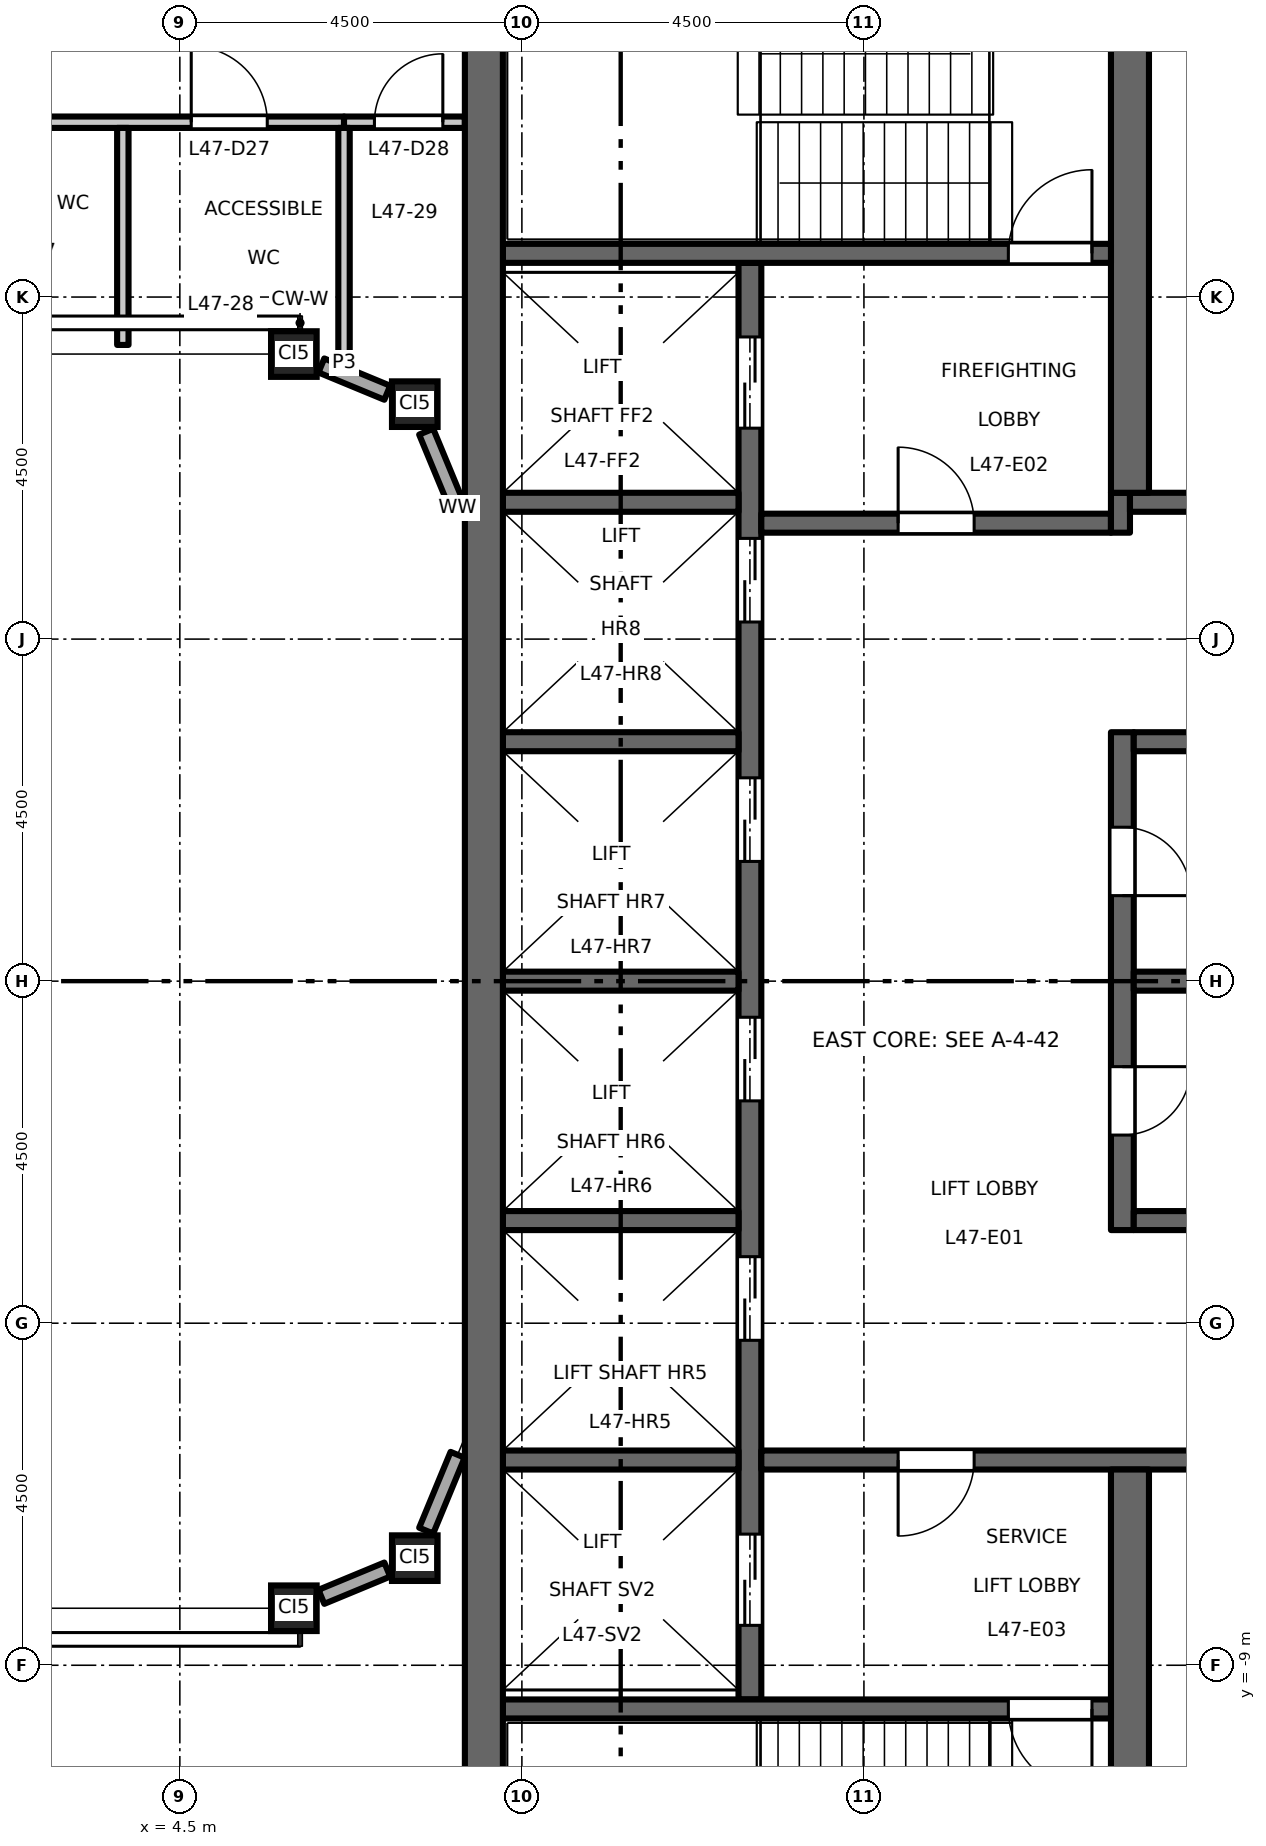
"""IFC4 building model, lengths in metres.
Left out: names, types, materials, properties, quantities, classifications, styles, units other than length and angle.
Written with IfcOpenShell. Run it as: python <this file> out.ifc"""

import sys

from ifc_helpers import new_model, si_unit, direction, frame, frame_2d, origin, origin_2d, place, context, subcontext, project, spatial, rectangle, hollow_rectangle, extrude, element, fill, save


model = new_model("IFC4")
c1 = context("Model", 3, precision=1e-05, world=origin(), true_north=direction((0.0, 1.0)))
c2 = subcontext(c1, "Body", "Model", "MODEL_VIEW")
j1 = project(units=[si_unit("LENGTHUNIT", "METRE"), si_unit("PLANEANGLEUNIT", "RADIAN")], contexts=[c1])
p1 = place(None, origin())
s1 = spatial("IfcSite", under=j1, at=p1, CompositionType="ELEMENT")
p2 = place(p1, origin())
s2 = spatial("IfcBuilding", under=s1, at=p2, CompositionType="ELEMENT")
p3 = place(p2, frame((0.0, 0.0, 219.7)))
s3 = spatial("IfcBuildingStorey", under=s2, at=p3, CompositionType="ELEMENT", Elevation=219.7)
for number, where, z_axis, x_axis in (
    (1, (6.0, -8.25, 0.0), (0.0, 0.0, 1.0), (1.0, 0.0, 0.0)),
    (2, (7.591, -7.591, 0.0), (0.0, 0.0, 1.0), (1.0, 0.0, 0.0)),
    (3, (6.0, 8.25, 0.0), (0.0, 0.0, 1.0), (1.0, 0.0, 0.0)),
    (4, (7.591, 7.591, 0.0), (0.0, 0.0, 1.0), (1.0, 0.0, 0.0)),
):
    element("IfcColumn", number, at=place(p3, frame(where, z_axis=z_axis, x_axis=x_axis)), inside=s3, PredefinedType="COLUMN", context=c2, shape_type="SweptSolid", body=[
        extrude(hollow_rectangle(XDim=0.6, YDim=0.6, WallThickness=0.032, at=origin_2d()), origin(), (0.0, 0.0, 1.0), 4.5),
    ])
p4 = place(p3, frame((12.0, -9.45, 0.0), z_axis=(0.0, 0.0, 1.0), x_axis=(0.0, 1.0, 0.0)))
e5 = element("IfcWall", 5, at=p4, inside=s3, PredefinedType="SHEAR", context=c2, shape_type="SweptSolid", body=[
    extrude(rectangle(XDim=18.9, YDim=0.3, at=frame_2d((9.45, 0.0))), origin(), (0.0, 0.0, 1.0), 4.35),
])
p5 = place(p4, frame((4.725, 0.0, 0.0)))
e6 = element("IfcOpeningElement", 6, at=p5, cuts=e5, PredefinedType="OPENING", context=c2, shape_type="SweptSolid", body=[
    extrude(rectangle(XDim=1.1, YDim=2.1, at=frame_2d((0.55, 1.05))), frame((0.0, 0.16, 0.0), z_axis=(0.0, -1.0, 0.0), x_axis=(1.0, 0.0, 0.0)), (0.0, 0.0, 1.0), 0.32),
])
p6 = place(p4, frame((7.875, 0.0, 0.0)))
e7 = element("IfcOpeningElement", 7, at=p6, cuts=e5, PredefinedType="OPENING", context=c2, shape_type="SweptSolid", body=[
    extrude(rectangle(XDim=1.1, YDim=2.1, at=frame_2d((0.55, 1.05))), frame((0.0, 0.16, 0.0), z_axis=(0.0, -1.0, 0.0), x_axis=(1.0, 0.0, 0.0)), (0.0, 0.0, 1.0), 0.32),
])
p7 = place(p4, frame((11.025, 0.0, 0.0)))
e8 = element("IfcOpeningElement", 8, at=p7, cuts=e5, PredefinedType="OPENING", context=c2, shape_type="SweptSolid", body=[
    extrude(rectangle(XDim=1.1, YDim=2.1, at=frame_2d((0.55, 1.05))), frame((0.0, 0.16, 0.0), z_axis=(0.0, -1.0, 0.0), x_axis=(1.0, 0.0, 0.0)), (0.0, 0.0, 1.0), 0.32),
])
p8 = place(p4, frame((14.175, 0.0, 0.0)))
e9 = element("IfcOpeningElement", 9, at=p8, cuts=e5, PredefinedType="OPENING", context=c2, shape_type="SweptSolid", body=[
    extrude(rectangle(XDim=1.1, YDim=2.1, at=frame_2d((0.55, 1.05))), frame((0.0, 0.16, 0.0), z_axis=(0.0, -1.0, 0.0), x_axis=(1.0, 0.0, 0.0)), (0.0, 0.0, 1.0), 0.32),
])
p9 = place(p4, frame((16.725, 0.0, 0.0)))
e10 = element("IfcOpeningElement", 10, at=p9, cuts=e5, PredefinedType="OPENING", context=c2, shape_type="SweptSolid", body=[
    extrude(rectangle(XDim=1.2, YDim=2.1, at=frame_2d((0.6, 1.05))), frame((0.0, 0.16, 0.0), z_axis=(0.0, -1.0, 0.0), x_axis=(1.0, 0.0, 0.0)), (0.0, 0.0, 1.0), 0.32),
])
p10 = place(p4, frame((0.975, 0.0, 0.0)))
e11 = element("IfcOpeningElement", 11, at=p10, cuts=e5, PredefinedType="OPENING", context=c2, shape_type="SweptSolid", body=[
    extrude(rectangle(XDim=1.2, YDim=2.1, at=frame_2d((0.6, 1.05))), frame((0.0, 0.16, 0.0), z_axis=(0.0, -1.0, 0.0), x_axis=(1.0, 0.0, 0.0)), (0.0, 0.0, 1.0), 0.32),
])
p11 = place(p3, frame((12.15, 6.025, 0.0), z_axis=(0.0, 0.0, 1.0), x_axis=(1.0, 0.0, 0.0)))
e12 = element("IfcWall", 12, at=p11, inside=s3, PredefinedType="SHEAR", context=c2, shape_type="SweptSolid", body=[
    extrude(rectangle(XDim=4.6, YDim=0.25, at=frame_2d((2.3, 0.0))), origin(), (0.0, 0.0, 1.0), 4.35),
])
p12 = place(p11, frame((1.8, 0.0, 0.0)))
e13 = element("IfcOpeningElement", 13, at=p12, cuts=e12, PredefinedType="OPENING", context=c2, shape_type="SweptSolid", body=[
    extrude(rectangle(XDim=1.0, YDim=2.1, at=frame_2d((0.5, 1.05))), frame((0.0, 0.135, 0.0), z_axis=(0.0, -1.0, 0.0), x_axis=(1.0, 0.0, 0.0)), (0.0, 0.0, 1.0), 0.27),
])
p13 = place(p3, frame((16.875, 5.9, 0.0), z_axis=(0.0, 0.0, 1.0), x_axis=(0.0, 1.0, 0.0)))
e14 = element("IfcWall", 14, at=p13, inside=s3, PredefinedType="SHEAR", context=c2, shape_type="SweptSolid", body=[
    extrude(rectangle(XDim=0.525, YDim=0.25, at=frame_2d((0.263, 0.0))), origin(), (0.0, 0.0, 1.0), 4.35),
])
p14 = place(p3, frame((17.0, 6.3, 0.0), z_axis=(0.0, 0.0, 1.0), x_axis=(1.0, 0.0, 0.0)))
e15 = element("IfcWall", 15, at=p14, inside=s3, PredefinedType="SHEAR", context=c2, shape_type="SweptSolid", body=[
    extrude(rectangle(XDim=4.25, YDim=0.25, at=frame_2d((2.125, 0.0))), origin(), (0.0, 0.0, 1.0), 4.35),
])
p15 = place(p3, frame((12.15, -6.3, 0.0), z_axis=(0.0, 0.0, 1.0), x_axis=(1.0, 0.0, 0.0)))
e16 = element("IfcWall", 16, at=p15, inside=s3, PredefinedType="SHEAR", context=c2, shape_type="SweptSolid", body=[
    extrude(rectangle(XDim=9.1, YDim=0.25, at=frame_2d((4.55, 0.0))), origin(), (0.0, 0.0, 1.0), 4.35),
])
p16 = place(p15, frame((1.8, 0.0, 0.0)))
e17 = element("IfcOpeningElement", 17, at=p16, cuts=e16, PredefinedType="OPENING", context=c2, shape_type="SweptSolid", body=[
    extrude(rectangle(XDim=1.0, YDim=2.1, at=frame_2d((0.5, 1.05))), frame((0.0, 0.135, 0.0), z_axis=(0.0, -1.0, 0.0), x_axis=(1.0, 0.0, 0.0)), (0.0, 0.0, 1.0), 0.27),
])
p17 = place(p3, frame((16.9, -3.275, 0.0), z_axis=(0.0, 0.0, 1.0), x_axis=(0.0, 1.0, 0.0)))
e18 = element("IfcWall", 18, at=p17, inside=s3, PredefinedType="SHEAR", context=c2, shape_type="SweptSolid", body=[
    extrude(rectangle(XDim=6.55, YDim=0.3, at=frame_2d((3.275, 0.0))), origin(), (0.0, 0.0, 1.0), 4.35),
])
p18 = place(p17, frame((1.25, 0.0, 0.0)))
e19 = element("IfcOpeningElement", 19, at=p18, cuts=e18, PredefinedType="OPENING", context=c2, shape_type="SweptSolid", body=[
    extrude(rectangle(XDim=0.9, YDim=2.1, at=frame_2d((0.45, 1.05))), frame((0.0, 0.16, 0.0), z_axis=(0.0, -1.0, 0.0), x_axis=(1.0, 0.0, 0.0)), (0.0, 0.0, 1.0), 0.32),
])
p19 = place(p17, frame((4.4, 0.0, 0.0)))
e20 = element("IfcOpeningElement", 20, at=p19, cuts=e18, PredefinedType="OPENING", context=c2, shape_type="SweptSolid", body=[
    extrude(rectangle(XDim=0.9, YDim=2.1, at=frame_2d((0.45, 1.05))), frame((0.0, 0.16, 0.0), z_axis=(0.0, -1.0, 0.0), x_axis=(1.0, 0.0, 0.0)), (0.0, 0.0, 1.0), 0.32),
])
for number, where, z_axis, x_axis in (
    (21, (17.05, 0.0, 0.0), (0.0, 0.0, 1.0), (1.0, 0.0, 0.0)),
    (22, (17.05, 3.15, 0.0), (0.0, 0.0, 1.0), (1.0, 0.0, 0.0)),
    (23, (17.05, -3.15, 0.0), (0.0, 0.0, 1.0), (1.0, 0.0, 0.0)),
):
    element("IfcWall", number, at=place(p3, frame(where, z_axis=z_axis, x_axis=x_axis)), inside=s3, PredefinedType="SHEAR", context=c2, shape_type="SweptSolid", body=[
        extrude(rectangle(XDim=4.2, YDim=0.25, at=frame_2d((2.1, 0.0))), origin(), (0.0, 0.0, 1.0), 4.35),
    ])
for number, where, z_axis, x_axis in (
    (24, (17.0, 6.425, 0.0), (0.0, 0.0, 1.0), (0.0, 1.0, 0.0)),
    (25, (17.0, -13.0, 0.0), (0.0, 0.0, 1.0), (0.0, 1.0, 0.0)),
):
    element("IfcWall", number, at=place(p3, frame(where, z_axis=z_axis, x_axis=x_axis)), inside=s3, PredefinedType="SHEAR", context=c2, shape_type="SweptSolid", body=[
        extrude(rectangle(XDim=6.575, YDim=0.5, at=frame_2d((3.288, 0.0))), origin(), (0.0, 0.0, 1.0), 4.35),
    ])
for number, where, z_axis, x_axis in (
    (26, (8.75, 0.0, 0.0), (0.0, 0.0, 1.0), (1.0, 0.0, 0.0)),
    (27, (8.75, 3.15, 0.0), (0.0, 0.0, 1.0), (1.0, 0.0, 0.0)),
    (28, (8.75, 6.3, 0.0), (0.0, 0.0, 1.0), (1.0, 0.0, 0.0)),
    (29, (8.75, -3.15, 0.0), (0.0, 0.0, 1.0), (1.0, 0.0, 0.0)),
    (30, (8.75, -6.3, 0.0), (0.0, 0.0, 1.0), (1.0, 0.0, 0.0)),
):
    element("IfcWall", number, at=place(p3, frame(where, z_axis=z_axis, x_axis=x_axis)), inside=s3, PredefinedType="SHEAR", context=c2, shape_type="SweptSolid", body=[
        extrude(rectangle(XDim=3.1, YDim=0.25, at=frame_2d((1.55, 0.0))), origin(), (0.0, 0.0, 1.0), 4.35),
    ])
p20 = place(p3, frame((8.75, 9.575, 0.0), z_axis=(0.0, 0.0, 1.0), x_axis=(1.0, 0.0, 0.0)))
e31 = element("IfcWall", 31, at=p20, inside=s3, PredefinedType="SHEAR", context=c2, shape_type="SweptSolid", body=[
    extrude(rectangle(XDim=8.0, YDim=0.25, at=frame_2d((4.0, 0.0))), origin(), (0.0, 0.0, 1.0), 4.35),
])
p21 = place(p20, frame((6.65, 0.0, 0.0)))
e32 = element("IfcOpeningElement", 32, at=p21, cuts=e31, PredefinedType="OPENING", context=c2, shape_type="SweptSolid", body=[
    extrude(rectangle(XDim=1.1, YDim=2.1, at=frame_2d((0.55, 1.05))), frame((0.0, 0.135, 0.0), z_axis=(0.0, -1.0, 0.0), x_axis=(1.0, 0.0, 0.0)), (0.0, 0.0, 1.0), 0.27),
])
p22 = place(p3, frame((8.75, -9.575, 0.0), z_axis=(0.0, 0.0, 1.0), x_axis=(1.0, 0.0, 0.0)))
e33 = element("IfcWall", 33, at=p22, inside=s3, PredefinedType="SHEAR", context=c2, shape_type="SweptSolid", body=[
    extrude(rectangle(XDim=8.0, YDim=0.25, at=frame_2d((4.0, 0.0))), origin(), (0.0, 0.0, 1.0), 4.35),
])
p23 = place(p22, frame((6.65, 0.0, 0.0)))
e34 = element("IfcOpeningElement", 34, at=p23, cuts=e33, PredefinedType="OPENING", context=c2, shape_type="SweptSolid", body=[
    extrude(rectangle(XDim=1.1, YDim=2.1, at=frame_2d((0.55, 1.05))), frame((0.0, 0.135, 0.0), z_axis=(0.0, -1.0, 0.0), x_axis=(1.0, 0.0, 0.0)), (0.0, 0.0, 1.0), 0.27),
])
p24 = place(p3, frame((8.5, -13.0, 0.0), z_axis=(0.0, 0.0, 1.0), x_axis=(0.0, 1.0, 0.0)))
e35 = element("IfcWall", 35, at=p24, inside=s3, PredefinedType="SHEAR", context=c2, shape_type="SweptSolid", body=[
    extrude(rectangle(XDim=26.0, YDim=0.5, at=frame_2d((13.0, 0.0))), origin(), (0.0, 0.0, 1.0), 4.35),
])
p25 = place(p3, frame((6.362, -8.1, 0.0), z_axis=(0.0, 0.0, 1.0), x_axis=(0.923829670615, 0.382803787458, 0.0)))
e36 = element("IfcWall", 36, at=p25, inside=s3, PredefinedType="STANDARD", context=c2, shape_type="SweptSolid", body=[
    extrude(rectangle(XDim=0.938, YDim=0.2, at=frame_2d((0.469, 0.0))), origin(), (0.0, 0.0, 1.0), 3.918),
])
for number, where, z_axis, x_axis in (
    (37, (7.741, -7.229, 0.0), (0.0, 0.0, 1.0), (0.383, 0.924, 0.0)),
    (38, (8.154, 6.231, 0.0), (0.0, 0.0, 1.0), (-0.383, 0.924, 0.0)),
):
    element("IfcWall", number, at=place(p3, frame(where, z_axis=z_axis, x_axis=x_axis)), inside=s3, PredefinedType="STANDARD", context=c2, shape_type="SweptSolid", body=[
        extrude(rectangle(XDim=1.08, YDim=0.2, at=frame_2d((0.54, 0.0))), origin(), (0.0, 0.0, 1.0), 3.918),
    ])
p26 = place(p3, frame((7.229, 7.741, 0.0), z_axis=(0.0, 0.0, 1.0), x_axis=(-0.923829670615, 0.382803787458, 0.0)))
e39 = element("IfcWall", 39, at=p26, inside=s3, PredefinedType="STANDARD", context=c2, shape_type="SweptSolid", body=[
    extrude(rectangle(XDim=0.938, YDim=0.2, at=frame_2d((0.469, 0.0))), origin(), (0.0, 0.0, 1.0), 3.918),
])
p27 = place(p3, frame((-8.25, 11.3, 0.0), z_axis=(0.0, 0.0, 1.0), x_axis=(1.0, 0.0, 0.0)))
e40 = element("IfcWall", 40, at=p27, inside=s3, PredefinedType="PARTITIONING", context=c2, shape_type="SweptSolid", body=[
    extrude(rectangle(XDim=14.91, YDim=0.15, at=frame_2d((7.455, 0.0))), origin(), (0.0, 0.0, 1.0), 4.35),
])
p28 = place(p27, frame((2.4, 0.0, 0.0)))
e41 = element("IfcOpeningElement", 41, at=p28, cuts=e40, PredefinedType="OPENING", context=c2, shape_type="SweptSolid", body=[
    extrude(rectangle(XDim=1.0, YDim=2.1, at=frame_2d((0.5, 1.05))), frame((0.0, 0.085, 0.0), z_axis=(0.0, -1.0, 0.0), x_axis=(1.0, 0.0, 0.0)), (0.0, 0.0, 1.0), 0.17),
])
p29 = place(p27, frame((8.65, 0.0, 0.0)))
e42 = element("IfcOpeningElement", 42, at=p29, cuts=e40, PredefinedType="OPENING", context=c2, shape_type="SweptSolid", body=[
    extrude(rectangle(XDim=1.0, YDim=2.1, at=frame_2d((0.5, 1.05))), frame((0.0, 0.085, 0.0), z_axis=(0.0, -1.0, 0.0), x_axis=(1.0, 0.0, 0.0)), (0.0, 0.0, 1.0), 0.17),
])
p30 = place(p27, frame((12.9, 0.0, 0.0)))
e43 = element("IfcOpeningElement", 43, at=p30, cuts=e40, PredefinedType="OPENING", context=c2, shape_type="SweptSolid", body=[
    extrude(rectangle(XDim=1.0, YDim=2.1, at=frame_2d((0.5, 1.05))), frame((0.0, 0.085, 0.0), z_axis=(0.0, -1.0, 0.0), x_axis=(1.0, 0.0, 0.0)), (0.0, 0.0, 1.0), 0.17),
])
p31 = place(p3, frame((6.66, 11.3, 0.0), z_axis=(0.0, 0.0, 1.0), x_axis=(1.0, 0.0, 0.0)))
e44 = element("IfcWall", 44, at=p31, inside=s3, PredefinedType="PARTITIONING", context=c2, shape_type="SweptSolid", body=[
    extrude(rectangle(XDim=1.59, YDim=0.15, at=frame_2d((0.795, 0.0))), origin(), (0.0, 0.0, 1.0), 4.35),
])
p32 = place(p31, frame((0.4, 0.0, 0.0)))
e45 = element("IfcOpeningElement", 45, at=p32, cuts=e44, PredefinedType="OPENING", context=c2, shape_type="SweptSolid", body=[
    extrude(rectangle(XDim=0.9, YDim=2.1, at=frame_2d((0.45, 1.05))), frame((0.0, 0.085, 0.0), z_axis=(0.0, -1.0, 0.0), x_axis=(1.0, 0.0, 0.0)), (0.0, 0.0, 1.0), 0.17),
])
p33 = place(p3, frame((3.75, 8.37, 0.0), z_axis=(0.0, 0.0, 1.0), x_axis=(0.0, 1.0, 0.0)))
e46 = element("IfcWall", 46, at=p33, inside=s3, PredefinedType="PARTITIONING", context=c2, shape_type="SweptSolid", body=[
    extrude(rectangle(XDim=2.855, YDim=0.15, at=frame_2d((1.427, 0.0))), origin(), (0.0, 0.0, 1.0), 4.35),
])
p34 = place(p3, frame((6.66, 8.127, 0.0), z_axis=(0.0, 0.0, 1.0), x_axis=(0.0, 1.0, 0.0)))
e47 = element("IfcWall", 47, at=p34, inside=s3, PredefinedType="PARTITIONING", context=c2, shape_type="SweptSolid", body=[
    extrude(rectangle(XDim=3.098, YDim=0.15, at=frame_2d((1.549, 0.0))), origin(), (0.0, 0.0, 1.0), 4.35),
])
p35 = place(p12, origin())
e48 = element("IfcDoor", 48, at=p35, inside=s3, OperationType="SINGLE_SWING_RIGHT", PredefinedType="DOOR", context=c2, shape_type="SweptSolid", body=[
    extrude(rectangle(XDim=1.0, YDim=2.1, at=frame_2d((0.5, 1.05))), frame((0.0, 0.025, 0.0), z_axis=(0.0, -1.0, 0.0), x_axis=(1.0, 0.0, 0.0)), (0.0, 0.0, 1.0), 0.05),
])
fill(e13, e48)
p36 = place(p16, origin())
e49 = element("IfcDoor", 49, at=p36, inside=s3, OperationType="SINGLE_SWING_LEFT", PredefinedType="DOOR", context=c2, shape_type="SweptSolid", body=[
    extrude(rectangle(XDim=1.0, YDim=2.1, at=frame_2d((0.5, 1.05))), frame((0.0, 0.025, 0.0), z_axis=(0.0, -1.0, 0.0), x_axis=(1.0, 0.0, 0.0)), (0.0, 0.0, 1.0), 0.05),
])
fill(e17, e49)
p37 = place(p21, origin())
e50 = element("IfcDoor", 50, at=p37, inside=s3, OperationType="SINGLE_SWING_LEFT", PredefinedType="DOOR", context=c2, shape_type="SweptSolid", body=[
    extrude(rectangle(XDim=1.1, YDim=2.1, at=frame_2d((0.55, 1.05))), frame((0.0, 0.025, 0.0), z_axis=(0.0, -1.0, 0.0), x_axis=(1.0, 0.0, 0.0)), (0.0, 0.0, 1.0), 0.05),
])
fill(e32, e50)
p38 = place(p23, origin())
e51 = element("IfcDoor", 51, at=p38, inside=s3, OperationType="SINGLE_SWING_RIGHT", PredefinedType="DOOR", context=c2, shape_type="SweptSolid", body=[
    extrude(rectangle(XDim=1.1, YDim=2.1, at=frame_2d((0.55, 1.05))), frame((0.0, 0.025, 0.0), z_axis=(0.0, -1.0, 0.0), x_axis=(1.0, 0.0, 0.0)), (0.0, 0.0, 1.0), 0.05),
])
fill(e34, e51)
p39 = place(p5, origin())
e52 = element("IfcDoor", 52, at=p39, inside=s3, OperationType="DOUBLE_DOOR_SLIDING", PredefinedType="DOOR", context=c2, shape_type="SweptSolid", body=[
    extrude(rectangle(XDim=1.1, YDim=2.1, at=frame_2d((0.55, 1.05))), frame((0.0, 0.025, 0.0), z_axis=(0.0, -1.0, 0.0), x_axis=(1.0, 0.0, 0.0)), (0.0, 0.0, 1.0), 0.05),
])
fill(e6, e52)
p40 = place(p6, origin())
e53 = element("IfcDoor", 53, at=p40, inside=s3, OperationType="DOUBLE_DOOR_SLIDING", PredefinedType="DOOR", context=c2, shape_type="SweptSolid", body=[
    extrude(rectangle(XDim=1.1, YDim=2.1, at=frame_2d((0.55, 1.05))), frame((0.0, 0.025, 0.0), z_axis=(0.0, -1.0, 0.0), x_axis=(1.0, 0.0, 0.0)), (0.0, 0.0, 1.0), 0.05),
])
fill(e7, e53)
p41 = place(p7, origin())
e54 = element("IfcDoor", 54, at=p41, inside=s3, OperationType="DOUBLE_DOOR_SLIDING", PredefinedType="DOOR", context=c2, shape_type="SweptSolid", body=[
    extrude(rectangle(XDim=1.1, YDim=2.1, at=frame_2d((0.55, 1.05))), frame((0.0, 0.025, 0.0), z_axis=(0.0, -1.0, 0.0), x_axis=(1.0, 0.0, 0.0)), (0.0, 0.0, 1.0), 0.05),
])
fill(e8, e54)
p42 = place(p8, origin())
e55 = element("IfcDoor", 55, at=p42, inside=s3, OperationType="DOUBLE_DOOR_SLIDING", PredefinedType="DOOR", context=c2, shape_type="SweptSolid", body=[
    extrude(rectangle(XDim=1.1, YDim=2.1, at=frame_2d((0.55, 1.05))), frame((0.0, 0.025, 0.0), z_axis=(0.0, -1.0, 0.0), x_axis=(1.0, 0.0, 0.0)), (0.0, 0.0, 1.0), 0.05),
])
fill(e9, e55)
p43 = place(p9, origin())
e56 = element("IfcDoor", 56, at=p43, inside=s3, OperationType="DOUBLE_DOOR_SLIDING", PredefinedType="DOOR", context=c2, shape_type="SweptSolid", body=[
    extrude(rectangle(XDim=1.2, YDim=2.1, at=frame_2d((0.6, 1.05))), frame((0.0, 0.025, 0.0), z_axis=(0.0, -1.0, 0.0), x_axis=(1.0, 0.0, 0.0)), (0.0, 0.0, 1.0), 0.05),
])
fill(e10, e56)
p44 = place(p10, origin())
e57 = element("IfcDoor", 57, at=p44, inside=s3, OperationType="DOUBLE_DOOR_SLIDING", PredefinedType="DOOR", context=c2, shape_type="SweptSolid", body=[
    extrude(rectangle(XDim=1.2, YDim=2.1, at=frame_2d((0.6, 1.05))), frame((0.0, 0.025, 0.0), z_axis=(0.0, -1.0, 0.0), x_axis=(1.0, 0.0, 0.0)), (0.0, 0.0, 1.0), 0.05),
])
fill(e11, e57)
p45 = place(p18, origin())
e58 = element("IfcDoor", 58, at=p45, inside=s3, OperationType="SINGLE_SWING_RIGHT", PredefinedType="DOOR", context=c2, shape_type="SweptSolid", body=[
    extrude(rectangle(XDim=0.9, YDim=2.1, at=frame_2d((0.45, 1.05))), frame((0.0, 0.025, 0.0), z_axis=(0.0, -1.0, 0.0), x_axis=(1.0, 0.0, 0.0)), (0.0, 0.0, 1.0), 0.05),
])
fill(e19, e58)
p46 = place(p19, origin())
e59 = element("IfcDoor", 59, at=p46, inside=s3, OperationType="SINGLE_SWING_LEFT", PredefinedType="DOOR", context=c2, shape_type="SweptSolid", body=[
    extrude(rectangle(XDim=0.9, YDim=2.1, at=frame_2d((0.45, 1.05))), frame((0.0, 0.025, 0.0), z_axis=(0.0, -1.0, 0.0), x_axis=(1.0, 0.0, 0.0)), (0.0, 0.0, 1.0), 0.05),
])
fill(e20, e59)
p47 = place(p30, origin())
e60 = element("IfcDoor", 60, at=p47, inside=s3, OperationType="SINGLE_SWING_LEFT", PredefinedType="DOOR", context=c2, shape_type="SweptSolid", body=[
    extrude(rectangle(XDim=1.0, YDim=2.1, at=frame_2d((0.5, 1.05))), frame((0.0, 0.025, 0.0), z_axis=(0.0, -1.0, 0.0), x_axis=(1.0, 0.0, 0.0)), (0.0, 0.0, 1.0), 0.05),
])
fill(e43, e60)
p48 = place(p32, origin())
e61 = element("IfcDoor", 61, at=p48, inside=s3, OperationType="SINGLE_SWING_RIGHT", PredefinedType="DOOR", context=c2, shape_type="SweptSolid", body=[
    extrude(rectangle(XDim=0.9, YDim=2.1, at=frame_2d((0.45, 1.05))), frame((0.0, 0.025, 0.0), z_axis=(0.0, -1.0, 0.0), x_axis=(1.0, 0.0, 0.0)), (0.0, 0.0, 1.0), 0.05),
])
fill(e45, e61)
save(model, sys.argv[1])
